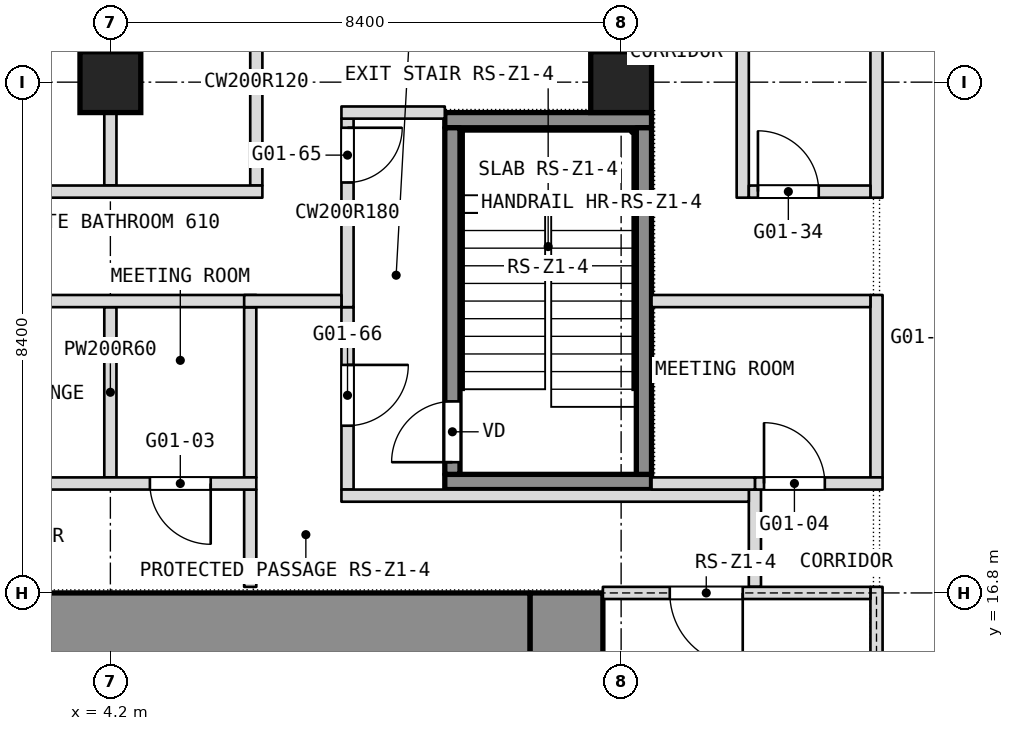
"""IFC4 building model, lengths in metres.
Left out: names, types, materials, properties, quantities, classifications, styles, units other than length and angle.
Written with IfcOpenShell. Run it as: python <this file> out.ifc"""

import sys

from ifc_helpers import new_model, si_unit, direction, frame, frame_2d, origin, origin_2d, place, context, subcontext, project, spatial, rectangle, extrude, element, fill, save


model = new_model("IFC4")
c1 = context("Model", 3, precision=1e-05, world=origin(), true_north=direction((0.0, 1.0)))
c2 = subcontext(c1, "Body", "Model", "MODEL_VIEW")
j1 = project(units=[si_unit("LENGTHUNIT", "METRE"), si_unit("PLANEANGLEUNIT", "RADIAN")], contexts=[c1])
p1 = place(None, origin())
s1 = spatial("IfcSite", under=j1, at=p1, CompositionType="ELEMENT")
p2 = place(p1, origin())
s2 = spatial("IfcBuilding", under=s1, at=p2, CompositionType="ELEMENT")
p3 = place(p2, frame((0.0, 0.0, 36.5)))
s3 = spatial("IfcBuildingStorey", under=s2, at=p3, CompositionType="ELEMENT", Elevation=36.5)
p4 = place(p3, frame((11.7, 0.0, 0.0), z_axis=(0.0, 0.0, 1.0), x_axis=(0.0, 1.0, 0.0)))
e1 = element("IfcWall", 1, at=p4, inside=s3, PredefinedType="SHEAR", context=c2, shape_type="SweptSolid", body=[
    extrude(rectangle(XDim=16.8, YDim=1.2, at=frame_2d((8.4, 0.0))), origin(), (0.0, 0.0, 1.0), 3.6),
])
p5 = place(p4, frame((1.688, 0.0, 0.0)))
e2 = element("IfcOpeningElement", 2, at=p5, cuts=e1, PredefinedType="OPENING", context=c2, shape_type="SweptSolid", body=[
    extrude(rectangle(XDim=0.9, YDim=2.1, at=frame_2d((0.45, 1.05))), frame((0.0, 0.6, 0.0), z_axis=(0.0, -1.0, 0.0), x_axis=(1.0, 0.0, 0.0)), (0.0, 0.0, 1.0), 1.2),
])
p6 = place(p4, frame((4.312, 0.0, 0.0)))
e3 = element("IfcOpeningElement", 3, at=p6, cuts=e1, PredefinedType="OPENING", context=c2, shape_type="SweptSolid", body=[
    extrude(rectangle(XDim=0.9, YDim=2.1, at=frame_2d((0.45, 1.05))), frame((0.0, 0.6, 0.0), z_axis=(0.0, -1.0, 0.0), x_axis=(1.0, 0.0, 0.0)), (0.0, 0.0, 1.0), 1.2),
])
p7 = place(p4, frame((6.825, 0.0, 0.0)))
e4 = element("IfcOpeningElement", 4, at=p7, cuts=e1, PredefinedType="OPENING", context=c2, shape_type="SweptSolid", body=[
    extrude(rectangle(XDim=1.2, YDim=2.1, at=frame_2d((0.6, 1.05))), frame((0.0, 0.6, 0.0), z_axis=(0.0, -1.0, 0.0), x_axis=(1.0, 0.0, 0.0)), (0.0, 0.0, 1.0), 1.2),
])
p8 = place(p4, frame((14.212, 0.0, 0.0)))
e5 = element("IfcOpeningElement", 5, at=p8, cuts=e1, PredefinedType="OPENING", context=c2, shape_type="SweptSolid", body=[
    extrude(rectangle(XDim=0.9, YDim=2.1, at=frame_2d((0.45, 1.05))), frame((0.0, 0.6, 0.0), z_axis=(0.0, -1.0, 0.0), x_axis=(1.0, 0.0, 0.0)), (0.0, 0.0, 1.0), 1.2),
])
p9 = place(p4, frame((11.587, 0.0, 0.0)))
e6 = element("IfcOpeningElement", 6, at=p9, cuts=e1, PredefinedType="OPENING", context=c2, shape_type="SweptSolid", body=[
    extrude(rectangle(XDim=0.9, YDim=2.1, at=frame_2d((0.45, 1.05))), frame((0.0, 0.6, 0.0), z_axis=(0.0, -1.0, 0.0), x_axis=(1.0, 0.0, 0.0)), (0.0, 0.0, 1.0), 1.2),
])
p10 = place(p4, frame((8.775, 0.0, 0.0)))
e7 = element("IfcOpeningElement", 7, at=p10, cuts=e1, PredefinedType="OPENING", context=c2, shape_type="SweptSolid", body=[
    extrude(rectangle(XDim=1.2, YDim=2.1, at=frame_2d((0.6, 1.05))), frame((0.0, 0.6, 0.0), z_axis=(0.0, -1.0, 0.0), x_axis=(1.0, 0.0, 0.0)), (0.0, 0.0, 1.0), 1.2),
])
p11 = place(p3, frame((-11.1, 16.2, 0.0), z_axis=(0.0, 0.0, 1.0), x_axis=(1.0, 0.0, 0.0)))
e8 = element("IfcWall", 8, at=p11, inside=s3, PredefinedType="SHEAR", context=c2, shape_type="SweptSolid", body=[
    extrude(rectangle(XDim=22.2, YDim=1.2, at=frame_2d((11.1, 0.0))), origin(), (0.0, 0.0, 1.0), 3.6),
])
for number, where, z_axis, x_axis in (
    (9, (4.2, 25.2, 0.0), (0.0, 0.0, 1.0), (1.0, 0.0, 0.0)),
    (10, (12.6, 25.2, 0.0), (0.0, 0.0, 1.0), (1.0, 0.0, 0.0)),
):
    element("IfcColumn", number, at=place(p3, frame(where, z_axis=z_axis, x_axis=x_axis)), inside=s3, PredefinedType="COLUMN", context=c2, shape_type="SweptSolid", body=[
        extrude(rectangle(XDim=1.0, YDim=1.0, at=origin_2d()), origin(), (0.0, 0.0, 1.0), 3.6),
    ])
p12 = place(p3, frame((16.8, 18.7, 0.0), z_axis=(0.0, 0.0, 1.0), x_axis=(0.0, 1.0, 0.0)))
e11 = element("IfcWall", 11, at=p12, inside=s3, PredefinedType="PARTITIONING", context=c2, shape_type="SweptSolid", body=[
    extrude(rectangle(XDim=3.0, YDim=0.2, at=frame_2d((1.5, 0.0))), origin(), (0.0, 0.0, 1.0), 3.34),
])
p13 = place(p3, frame((16.8, 23.3, 0.0), z_axis=(0.0, 0.0, 1.0), x_axis=(0.0, 1.0, 0.0)))
e12 = element("IfcWall", 12, at=p13, inside=s3, PredefinedType="PARTITIONING", context=c2, shape_type="SweptSolid", body=[
    extrude(rectangle(XDim=10.24, YDim=0.2, at=frame_2d((5.12, 0.0))), origin(), (0.0, 0.0, 1.0), 3.34),
])
p14 = place(p3, frame((14.8, 16.9, 0.0), z_axis=(0.0, 0.0, 1.0), x_axis=(0.0, 1.0, 0.0)))
e13 = element("IfcWall", 13, at=p14, inside=s3, PredefinedType="PARTITIONING", context=c2, shape_type="SweptSolid", body=[
    extrude(rectangle(XDim=1.6, YDim=0.2, at=frame_2d((0.8, 0.0))), origin(), (0.0, 0.0, 1.0), 3.34),
])
p15 = place(p3, frame((14.6, 23.3, 0.0), z_axis=(0.0, 0.0, 1.0), x_axis=(0.0, 1.0, 0.0)))
e14 = element("IfcWall", 14, at=p15, inside=s3, PredefinedType="PARTITIONING", context=c2, shape_type="SweptSolid", body=[
    extrude(rectangle(XDim=3.4, YDim=0.2, at=frame_2d((1.7, 0.0))), origin(), (0.0, 0.0, 1.0), 3.34),
])
p16 = place(p3, frame((8.1, 18.5, 0.0), z_axis=(0.0, 0.0, 1.0), x_axis=(0.0, 1.0, 0.0)))
e15 = element("IfcWall", 15, at=p16, inside=s3, PredefinedType="PARTITIONING", context=c2, shape_type="SweptSolid", body=[
    extrude(rectangle(XDim=3.0, YDim=0.2, at=frame_2d((1.5, 0.0))), origin(), (0.0, 0.0, 1.0), 3.34),
])
p17 = place(p16, frame((1.05, 0.0, 0.0)))
e16 = element("IfcOpeningElement", 16, at=p17, cuts=e15, PredefinedType="OPENING", context=c2, shape_type="SweptSolid", body=[
    extrude(rectangle(XDim=1.0, YDim=2.1, at=frame_2d((0.5, 1.05))), frame((0.0, 0.1, 0.0), z_axis=(0.0, -1.0, 0.0), x_axis=(1.0, 0.0, 0.0)), (0.0, 0.0, 1.0), 0.2),
])
p18 = place(p3, frame((8.1, 21.5, 0.0), z_axis=(0.0, 0.0, 1.0), x_axis=(0.0, 1.0, 0.0)))
e17 = element("IfcWall", 17, at=p18, inside=s3, PredefinedType="PARTITIONING", context=c2, shape_type="SweptSolid", body=[
    extrude(rectangle(XDim=3.1, YDim=0.2, at=frame_2d((1.55, 0.0))), origin(), (0.0, 0.0, 1.0), 3.34),
])
p19 = place(p18, frame((2.05, 0.0, 0.0)))
e18 = element("IfcOpeningElement", 18, at=p19, cuts=e17, PredefinedType="OPENING", context=c2, shape_type="SweptSolid", body=[
    extrude(rectangle(XDim=0.9, YDim=2.1, at=frame_2d((0.45, 1.05))), frame((0.0, 0.1, 0.0), z_axis=(0.0, -1.0, 0.0), x_axis=(1.0, 0.0, 0.0)), (0.0, 0.0, 1.0), 0.2),
])
p20 = place(p3, frame((6.6, 23.5, 0.0), z_axis=(0.0, 0.0, 1.0), x_axis=(0.0, 1.0, 0.0)))
e19 = element("IfcWall", 19, at=p20, inside=s3, PredefinedType="PARTITIONING", context=c2, shape_type="SweptSolid", body=[
    extrude(rectangle(XDim=3.4, YDim=0.2, at=frame_2d((1.7, 0.0))), origin(), (0.0, 0.0, 1.0), 3.34),
])
p21 = place(p3, frame((6.5, 18.7, 0.0), z_axis=(0.0, 0.0, 1.0), x_axis=(0.0, 1.0, 0.0)))
e20 = element("IfcWall", 20, at=p21, inside=s3, PredefinedType="PARTITIONING", context=c2, shape_type="SweptSolid", body=[
    extrude(rectangle(XDim=2.8, YDim=0.2, at=frame_2d((1.4, 0.0))), origin(), (0.0, 0.0, 1.0), 3.34),
])
p22 = place(p3, frame((6.5, 16.9, 0.0), z_axis=(0.0, 0.0, 1.0), x_axis=(0.0, 1.0, 0.0)))
e21 = element("IfcWall", 21, at=p22, inside=s3, PredefinedType="PARTITIONING", context=c2, shape_type="SweptSolid", body=[
    extrude(rectangle(XDim=1.6, YDim=0.2, at=frame_2d((0.8, 0.0))), origin(), (0.0, 0.0, 1.0), 3.34),
])
p23 = place(p3, frame((4.2, 18.7, 0.0), z_axis=(0.0, 0.0, 1.0), x_axis=(0.0, 1.0, 0.0)))
e22 = element("IfcWall", 22, at=p23, inside=s3, PredefinedType="PARTITIONING", context=c2, shape_type="SweptSolid", body=[
    extrude(rectangle(XDim=2.8, YDim=0.2, at=frame_2d((1.4, 0.0))), origin(), (0.0, 0.0, 1.0), 3.34),
])
p24 = place(p3, frame((4.2, 23.5, 0.0), z_axis=(0.0, 0.0, 1.0), x_axis=(0.0, 1.0, 0.0)))
e23 = element("IfcWall", 23, at=p24, inside=s3, PredefinedType="PARTITIONING", context=c2, shape_type="SweptSolid", body=[
    extrude(rectangle(XDim=10.04, YDim=0.2, at=frame_2d((5.02, 0.0))), origin(), (0.0, 0.0, 1.0), 3.34),
])
p25 = place(p3, frame((8.0, 18.4, 0.0), z_axis=(0.0, 0.0, 1.0), x_axis=(1.0, 0.0, 0.0)))
e24 = element("IfcWall", 24, at=p25, inside=s3, PredefinedType="PARTITIONING", context=c2, shape_type="SweptSolid", body=[
    extrude(rectangle(XDim=6.7, YDim=0.2, at=frame_2d((3.35, 0.0))), origin(), (0.0, 0.0, 1.0), 3.34),
])
p26 = place(p3, frame((-13.2, 18.6, 0.0), z_axis=(0.0, 0.0, 1.0), x_axis=(1.0, 0.0, 0.0)))
e25 = element("IfcWall", 25, at=p26, inside=s3, PredefinedType="PARTITIONING", context=c2, shape_type="SweptSolid", body=[
    extrude(rectangle(XDim=19.8, YDim=0.2, at=frame_2d((9.9, 0.0))), origin(), (0.0, 0.0, 1.0), 3.34),
])
p27 = place(p26, frame((3.9, 0.0, 0.0)))
e26 = element("IfcOpeningElement", 26, at=p27, cuts=e25, PredefinedType="OPENING", context=c2, shape_type="SweptSolid", body=[
    extrude(rectangle(XDim=1.8, YDim=2.1, at=frame_2d((0.9, 1.05))), frame((0.0, 0.1, 0.0), z_axis=(0.0, -1.0, 0.0), x_axis=(1.0, 0.0, 0.0)), (0.0, 0.0, 1.0), 0.2),
])
p28 = place(p26, frame((12.3, 0.0, 0.0)))
e27 = element("IfcOpeningElement", 27, at=p28, cuts=e25, PredefinedType="OPENING", context=c2, shape_type="SweptSolid", body=[
    extrude(rectangle(XDim=1.8, YDim=2.1, at=frame_2d((0.9, 1.05))), frame((0.0, 0.1, 0.0), z_axis=(0.0, -1.0, 0.0), x_axis=(1.0, 0.0, 0.0)), (0.0, 0.0, 1.0), 0.2),
])
p29 = place(p26, frame((18.05, 0.0, 0.0)))
e28 = element("IfcOpeningElement", 28, at=p29, cuts=e25, PredefinedType="OPENING", context=c2, shape_type="SweptSolid", body=[
    extrude(rectangle(XDim=1.0, YDim=2.1, at=frame_2d((0.5, 1.05))), frame((0.0, 0.1, 0.0), z_axis=(0.0, -1.0, 0.0), x_axis=(1.0, 0.0, 0.0)), (0.0, 0.0, 1.0), 0.2),
])
p30 = place(p3, frame((14.8, 18.6, 0.0), z_axis=(0.0, 0.0, 1.0), x_axis=(1.0, 0.0, 0.0)))
e29 = element("IfcWall", 29, at=p30, inside=s3, PredefinedType="PARTITIONING", context=c2, shape_type="SweptSolid", body=[
    extrude(rectangle(XDim=2.1, YDim=0.2, at=frame_2d((1.05, 0.0))), origin(), (0.0, 0.0, 1.0), 3.34),
])
p31 = place(p30, frame((0.15, 0.0, 0.0)))
e30 = element("IfcOpeningElement", 30, at=p31, cuts=e29, PredefinedType="OPENING", context=c2, shape_type="SweptSolid", body=[
    extrude(rectangle(XDim=1.0, YDim=2.1, at=frame_2d((0.5, 1.05))), frame((0.0, 0.1, 0.0), z_axis=(0.0, -1.0, 0.0), x_axis=(1.0, 0.0, 0.0)), (0.0, 0.0, 1.0), 0.2),
])
p32 = place(p3, frame((13.1, 18.6, 0.0), z_axis=(0.0, 0.0, 1.0), x_axis=(1.0, 0.0, 0.0)))
e31 = element("IfcWall", 31, at=p32, inside=s3, PredefinedType="PARTITIONING", context=c2, shape_type="SweptSolid", body=[
    extrude(rectangle(XDim=1.7, YDim=0.2, at=frame_2d((0.85, 0.0))), origin(), (0.0, 0.0, 1.0), 3.34),
])
p33 = place(p3, frame((-16.7, 21.6, 0.0), z_axis=(0.0, 0.0, 1.0), x_axis=(1.0, 0.0, 0.0)))
e32 = element("IfcWall", 32, at=p33, inside=s3, PredefinedType="PARTITIONING", context=c2, shape_type="SweptSolid", body=[
    extrude(rectangle(XDim=23.3, YDim=0.2, at=frame_2d((11.65, 0.0))), origin(), (0.0, 0.0, 1.0), 3.34),
])
p34 = place(p3, frame((13.1, 21.6, 0.0), z_axis=(0.0, 0.0, 1.0), x_axis=(1.0, 0.0, 0.0)))
e33 = element("IfcWall", 33, at=p34, inside=s3, PredefinedType="PARTITIONING", context=c2, shape_type="SweptSolid", body=[
    extrude(rectangle(XDim=3.6, YDim=0.2, at=frame_2d((1.8, 0.0))), origin(), (0.0, 0.0, 1.0), 3.34),
])
p35 = place(p3, frame((6.4, 21.6, 0.0), z_axis=(0.0, 0.0, 1.0), x_axis=(1.0, 0.0, 0.0)))
e34 = element("IfcWall", 34, at=p35, inside=s3, PredefinedType="PARTITIONING", context=c2, shape_type="SweptSolid", body=[
    extrude(rectangle(XDim=1.6, YDim=0.2, at=frame_2d((0.8, 0.0))), origin(), (0.0, 0.0, 1.0), 3.34),
])
p36 = place(p3, frame((-16.7, 23.4, 0.0), z_axis=(0.0, 0.0, 1.0), x_axis=(1.0, 0.0, 0.0)))
e35 = element("IfcWall", 35, at=p36, inside=s3, PredefinedType="PARTITIONING", context=c2, shape_type="SweptSolid", body=[
    extrude(rectangle(XDim=23.4, YDim=0.2, at=frame_2d((11.7, 0.0))), origin(), (0.0, 0.0, 1.0), 3.34),
])
p37 = place(p36, frame((2.4, 0.0, 0.0)))
e36 = element("IfcOpeningElement", 36, at=p37, cuts=e35, PredefinedType="OPENING", context=c2, shape_type="SweptSolid", body=[
    extrude(rectangle(XDim=0.9, YDim=2.1, at=frame_2d((0.45, 1.05))), frame((0.0, 0.1, 0.0), z_axis=(0.0, -1.0, 0.0), x_axis=(1.0, 0.0, 0.0)), (0.0, 0.0, 1.0), 0.2),
])
p38 = place(p36, frame((5.65, 0.0, 0.0)))
e37 = element("IfcOpeningElement", 37, at=p38, cuts=e35, PredefinedType="OPENING", context=c2, shape_type="SweptSolid", body=[
    extrude(rectangle(XDim=1.1, YDim=2.1, at=frame_2d((0.55, 1.05))), frame((0.0, 0.1, 0.0), z_axis=(0.0, -1.0, 0.0), x_axis=(1.0, 0.0, 0.0)), (0.0, 0.0, 1.0), 0.2),
])
p39 = place(p36, frame((15.3, 0.0, 0.0)))
e38 = element("IfcOpeningElement", 38, at=p39, cuts=e35, PredefinedType="OPENING", context=c2, shape_type="SweptSolid", body=[
    extrude(rectangle(XDim=1.0, YDim=2.1, at=frame_2d((0.5, 1.05))), frame((0.0, 0.1, 0.0), z_axis=(0.0, -1.0, 0.0), x_axis=(1.0, 0.0, 0.0)), (0.0, 0.0, 1.0), 0.2),
])
p40 = place(p36, frame((17.1, 0.0, 0.0)))
e39 = element("IfcOpeningElement", 39, at=p40, cuts=e35, PredefinedType="OPENING", context=c2, shape_type="SweptSolid", body=[
    extrude(rectangle(XDim=1.0, YDim=2.1, at=frame_2d((0.5, 1.05))), frame((0.0, 0.1, 0.0), z_axis=(0.0, -1.0, 0.0), x_axis=(1.0, 0.0, 0.0)), (0.0, 0.0, 1.0), 0.2),
])
p41 = place(p3, frame((14.7, 23.4, 0.0), z_axis=(0.0, 0.0, 1.0), x_axis=(1.0, 0.0, 0.0)))
e40 = element("IfcWall", 40, at=p41, inside=s3, PredefinedType="PARTITIONING", context=c2, shape_type="SweptSolid", body=[
    extrude(rectangle(XDim=2.0, YDim=0.2, at=frame_2d((1.0, 0.0))), origin(), (0.0, 0.0, 1.0), 3.34),
])
p42 = place(p41, frame((0.15, 0.0, 0.0)))
e41 = element("IfcOpeningElement", 41, at=p42, cuts=e40, PredefinedType="OPENING", context=c2, shape_type="SweptSolid", body=[
    extrude(rectangle(XDim=1.0, YDim=2.1, at=frame_2d((0.5, 1.05))), frame((0.0, 0.1, 0.0), z_axis=(0.0, -1.0, 0.0), x_axis=(1.0, 0.0, 0.0)), (0.0, 0.0, 1.0), 0.2),
])
p43 = place(p3, frame((8.0, 24.7, 0.0), z_axis=(0.0, 0.0, 1.0), x_axis=(1.0, 0.0, 0.0)))
e42 = element("IfcWall", 42, at=p43, inside=s3, PredefinedType="PARTITIONING", context=c2, shape_type="SweptSolid", body=[
    extrude(rectangle(XDim=1.7, YDim=0.2, at=frame_2d((0.85, 0.0))), origin(), (0.0, 0.0, 1.0), 3.34),
])
p44 = place(p3, frame((16.8, -0.1, 0.0), z_axis=(0.0, 0.0, 1.0), x_axis=(0.0, 1.0, 0.0)))
e43 = element("IfcWall", 43, at=p44, inside=s3, PredefinedType="PARTITIONING", context=c2, shape_type="SweptSolid", body=[
    extrude(rectangle(XDim=17.0, YDim=0.2, at=frame_2d((8.5, 0.0))), origin(), (0.0, 0.0, 1.0), 3.34),
])
p45 = place(p44, frame((2.2, 0.0, 0.0)))
e44 = element("IfcOpeningElement", 44, at=p45, cuts=e43, PredefinedType="OPENING", context=c2, shape_type="SweptSolid", body=[
    extrude(rectangle(XDim=1.8, YDim=2.1, at=frame_2d((0.9, 1.05))), frame((0.0, 0.1, 0.0), z_axis=(0.0, -1.0, 0.0), x_axis=(1.0, 0.0, 0.0)), (0.0, 0.0, 1.0), 0.2),
])
p46 = place(p44, frame((13.0, 0.0, 0.0)))
e45 = element("IfcOpeningElement", 45, at=p46, cuts=e43, PredefinedType="OPENING", context=c2, shape_type="SweptSolid", body=[
    extrude(rectangle(XDim=1.8, YDim=2.1, at=frame_2d((0.9, 1.05))), frame((0.0, 0.1, 0.0), z_axis=(0.0, -1.0, 0.0), x_axis=(1.0, 0.0, 0.0)), (0.0, 0.0, 1.0), 0.2),
])
p47 = place(p3, frame((12.3, 16.8, 0.0), z_axis=(0.0, 0.0, 1.0), x_axis=(1.0, 0.0, 0.0)))
e46 = element("IfcWall", 46, at=p47, inside=s3, PredefinedType="PARTITIONING", context=c2, shape_type="SweptSolid", body=[
    extrude(rectangle(XDim=4.4, YDim=0.2, at=frame_2d((2.2, 0.0))), origin(), (0.0, 0.0, 1.0), 2.84),
])
p48 = place(p47, frame((1.1, 0.0, 0.0)))
e47 = element("IfcOpeningElement", 47, at=p48, cuts=e46, PredefinedType="OPENING", context=c2, shape_type="SweptSolid", body=[
    extrude(rectangle(XDim=1.2, YDim=2.1, at=frame_2d((0.6, 1.05))), frame((0.0, 0.1, 0.0), z_axis=(0.0, -1.0, 0.0), x_axis=(1.0, 0.0, 0.0)), (0.0, 0.0, 1.0), 0.2),
])
for number, where, z_axis, x_axis in (
    (48, (9.7, 18.625, -0.15), (0.0, 0.0, 1.0), (1.0, 0.0, 0.0)),
    (49, (9.7, 24.575, -0.15), (0.0, 0.0, 1.0), (1.0, 0.0, 0.0)),
):
    element("IfcWall", number, at=place(p3, frame(where, z_axis=z_axis, x_axis=x_axis)), inside=s3, PredefinedType="SHEAR", context=c2, shape_type="SweptSolid", body=[
        extrude(rectangle(XDim=3.4, YDim=0.25, at=frame_2d((1.7, 0.0))), origin(), (0.0, 0.0, 1.0), 3.85),
    ])
p49 = place(p3, frame((9.825, 18.75, -0.15), z_axis=(0.0, 0.0, 1.0), x_axis=(0.0, 1.0, 0.0)))
e50 = element("IfcWall", 50, at=p49, inside=s3, PredefinedType="SHEAR", context=c2, shape_type="SweptSolid", body=[
    extrude(rectangle(XDim=5.7, YDim=0.25, at=frame_2d((2.85, 0.0))), origin(), (0.0, 0.0, 1.0), 3.85),
])
p50 = place(p49, frame((0.2, 0.0, 0.0)))
e51 = element("IfcOpeningElement", 51, at=p50, cuts=e50, PredefinedType="OPENING", context=c2, shape_type="SweptSolid", body=[
    extrude(rectangle(XDim=1.0, YDim=2.1, at=frame_2d((0.5, 1.05))), frame((0.0, 0.125, 0.0), z_axis=(0.0, -1.0, 0.0), x_axis=(1.0, 0.0, 0.0)), (0.0, 0.0, 1.0), 0.25),
])
p51 = place(p3, frame((12.975, 18.75, -0.15), z_axis=(0.0, 0.0, 1.0), x_axis=(0.0, 1.0, 0.0)))
e52 = element("IfcWall", 52, at=p51, inside=s3, PredefinedType="SHEAR", context=c2, shape_type="SweptSolid", body=[
    extrude(rectangle(XDim=5.7, YDim=0.25, at=frame_2d((2.85, 0.0))), origin(), (0.0, 0.0, 1.0), 3.85),
])
p52 = place(p17, origin())
e53 = element("IfcDoor", 53, at=p52, inside=s3, OperationType="SINGLE_SWING_RIGHT", PredefinedType="DOOR", context=c2, shape_type="SweptSolid", body=[
    extrude(rectangle(XDim=1.0, YDim=2.1, at=frame_2d((0.5, 1.05))), frame((0.0, 0.025, 0.0), z_axis=(0.0, -1.0, 0.0), x_axis=(1.0, 0.0, 0.0)), (0.0, 0.0, 1.0), 0.05),
])
fill(e16, e53)
p53 = place(p19, origin())
e54 = element("IfcDoor", 54, at=p53, inside=s3, OperationType="SINGLE_SWING_LEFT", PredefinedType="DOOR", context=c2, shape_type="SweptSolid", body=[
    extrude(rectangle(XDim=0.9, YDim=2.1, at=frame_2d((0.45, 1.05))), frame((0.0, 0.025, 0.0), z_axis=(0.0, -1.0, 0.0), x_axis=(1.0, 0.0, 0.0)), (0.0, 0.0, 1.0), 0.05),
])
fill(e18, e54)
p54 = place(p29, origin())
e55 = element("IfcDoor", 55, at=p54, inside=s3, OperationType="SINGLE_SWING_LEFT", PredefinedType="DOOR", context=c2, shape_type="SweptSolid", body=[
    extrude(rectangle(XDim=1.0, YDim=2.1, at=frame_2d((0.5, 1.05))), frame((0.0, 0.025, 0.0), z_axis=(0.0, -1.0, 0.0), x_axis=(1.0, 0.0, 0.0)), (0.0, 0.0, 1.0), 0.05),
])
fill(e28, e55)
p55 = place(p31, origin())
e56 = element("IfcDoor", 56, at=p55, inside=s3, OperationType="SINGLE_SWING_RIGHT", PredefinedType="DOOR", context=c2, shape_type="SweptSolid", body=[
    extrude(rectangle(XDim=1.0, YDim=2.1, at=frame_2d((0.5, 1.05))), frame((0.0, 0.025, 0.0), z_axis=(0.0, -1.0, 0.0), x_axis=(1.0, 0.0, 0.0)), (0.0, 0.0, 1.0), 0.05),
])
fill(e30, e56)
p56 = place(p42, origin())
e57 = element("IfcDoor", 57, at=p56, inside=s3, OperationType="SINGLE_SWING_LEFT", PredefinedType="DOOR", context=c2, shape_type="SweptSolid", body=[
    extrude(rectangle(XDim=1.0, YDim=2.1, at=frame_2d((0.5, 1.05))), frame((0.0, 0.025, 0.0), z_axis=(0.0, -1.0, 0.0), x_axis=(1.0, 0.0, 0.0)), (0.0, 0.0, 1.0), 0.05),
])
fill(e41, e57)
p57 = place(p50, origin())
e58 = element("IfcDoor", 58, at=p57, inside=s3, OperationType="SINGLE_SWING_LEFT", PredefinedType="DOOR", context=c2, shape_type="SweptSolid", body=[
    extrude(rectangle(XDim=1.0, YDim=2.1, at=frame_2d((0.5, 1.05))), frame((0.0, 0.025, 0.0), z_axis=(0.0, -1.0, 0.0), x_axis=(1.0, 0.0, 0.0)), (0.0, 0.0, 1.0), 0.05),
])
fill(e51, e58)
p58 = place(p48, origin())
e59 = element("IfcDoor", 59, at=p58, inside=s3, OperationType="SINGLE_SWING_LEFT", PredefinedType="DOOR", context=c2, shape_type="SweptSolid", body=[
    extrude(rectangle(XDim=1.2, YDim=2.1, at=frame_2d((0.6, 1.05))), frame((0.0, 0.025, 0.0), z_axis=(0.0, -1.0, 0.0), x_axis=(1.0, 0.0, 0.0)), (0.0, 0.0, 1.0), 0.05),
])
fill(e47, e59)
save(model, sys.argv[1])
